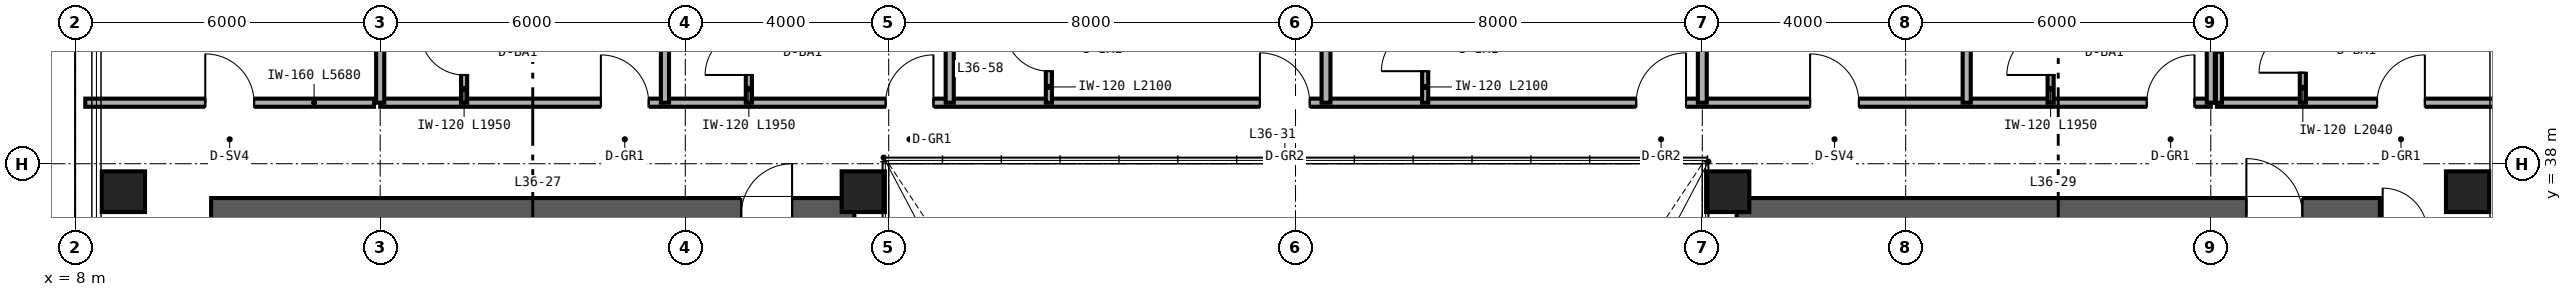
"""IFC4 building model, lengths in metres.
Left out: names, types, materials, properties, quantities, classifications, styles, units other than length and angle.
Written with IfcOpenShell. Run it as: python <this file> out.ifc"""

import sys

from ifc_helpers import new_model, si_unit, direction, frame, frame_2d, origin, origin_2d, place, context, subcontext, project, spatial, rectangle, hollow_rectangle, extrude, source, transform, mapped, element, fill, save


model = new_model("IFC4")
c1 = context("Model", 3, precision=1e-05, world=origin(), true_north=direction((0.0, 1.0)))
c2 = subcontext(c1, "Body", "Model", "MODEL_VIEW")
j1 = project(units=[si_unit("LENGTHUNIT", "METRE"), si_unit("PLANEANGLEUNIT", "RADIAN")], contexts=[c1])
p1 = place(None, origin())
s1 = spatial("IfcSite", under=j1, at=p1, CompositionType="ELEMENT")
p2 = place(p1, origin())
s2 = spatial("IfcBuilding", under=s1, at=p2, CompositionType="ELEMENT")
p3 = place(p2, frame((0.0, 0.0, 144.0)))
s3 = spatial("IfcBuildingStorey", under=s2, at=p3, CompositionType="ELEMENT", Elevation=144.0)
p4 = place(p3, frame((10.675, 37.0, 0.0), z_axis=(0.0, 0.0, 1.0), x_axis=(1.0, 0.0, 0.0)))
e1 = element("IfcWall", 1, at=p4, inside=s3, PredefinedType="SHEAR", context=c2, shape_type="SweptSolid", body=[
    extrude(rectangle(XDim=12.65, YDim=0.65, at=frame_2d((6.325, 0.0))), origin(), (0.0, 0.0, 1.0), 3.36),
])
p5 = place(p4, frame((10.425, 0.0, 0.0)))
e2 = element("IfcOpeningElement", 2, at=p5, cuts=e1, PredefinedType="OPENING", context=c2, shape_type="SweptSolid", body=[
    extrude(rectangle(XDim=1.0, YDim=2.15, at=frame_2d((0.5, 1.075))), frame((0.0, 0.335, 0.0), z_axis=(0.0, -1.0, 0.0), x_axis=(1.0, 0.0, 0.0)), (0.0, 0.0, 1.0), 0.67),
])
p6 = place(p3, frame((40.675, 37.0, 0.0), z_axis=(0.0, 0.0, 1.0), x_axis=(1.0, 0.0, 0.0)))
e3 = element("IfcWall", 3, at=p6, inside=s3, PredefinedType="SHEAR", context=c2, shape_type="SweptSolid", body=[
    extrude(rectangle(XDim=12.65, YDim=0.65, at=frame_2d((6.325, 0.0))), origin(), (0.0, 0.0, 1.0), 3.36),
])
p7 = place(p6, frame((10.025, 0.0, 0.0)))
e4 = element("IfcOpeningElement", 4, at=p7, cuts=e3, PredefinedType="OPENING", context=c2, shape_type="SweptSolid", body=[
    extrude(rectangle(XDim=1.1, YDim=2.15, at=frame_2d((0.55, 1.075))), frame((0.0, 0.335, 0.0), z_axis=(0.0, -1.0, 0.0), x_axis=(1.0, 0.0, 0.0)), (0.0, 0.0, 1.0), 0.67),
])
m1 = source(origin(), c2, "Body", "SweptSolid", [
    extrude(hollow_rectangle(XDim=0.85, YDim=0.8, WallThickness=0.032, at=origin_2d()), origin(), (0.0, 0.0, 1.0), 3.36),
])
for number, where, z_axis, x_axis in (
    (5, (8.95, 37.45, 0.0), (0.0, 0.0, 1.0), (1.0, 0.0, 0.0)),
    (6, (23.5, 37.45, 0.0), (0.0, 0.0, 1.0), (1.0, 0.0, 0.0)),
    (7, (40.5, 37.45, 0.0), (0.0, 0.0, 1.0), (1.0, 0.0, 0.0)),
    (8, (55.05, 37.45, 0.0), (0.0, 0.0, 1.0), (1.0, 0.0, 0.0)),
):
    element("IfcColumn", number, at=place(p3, frame(where, z_axis=z_axis, x_axis=x_axis)), inside=s3, PredefinedType="COLUMN", context=c2, shape_type="MappedRepresentation", body=[
        mapped(m1, transform((0.0, 0.0, 0.0), scale=1.0)),
    ])
p8 = place(p3, frame((8.2, 39.2, 0.0), z_axis=(0.0, 0.0, 1.0), x_axis=(1.0, 0.0, 0.0)))
e9 = element("IfcWall", 9, at=p8, inside=s3, PredefinedType="PARTITIONING", context=c2, shape_type="SweptSolid", body=[
    extrude(rectangle(XDim=5.68, YDim=0.16, at=frame_2d((2.84, 0.0))), origin(), (0.0, 0.0, 1.0), 3.36),
])
p9 = place(p8, frame((2.36, 0.0, 0.0)))
e10 = element("IfcOpeningElement", 10, at=p9, cuts=e9, PredefinedType="OPENING", context=c2, shape_type="SweptSolid", body=[
    extrude(rectangle(XDim=0.96, YDim=2.15, at=frame_2d((0.48, 1.075))), frame((0.0, 0.09, 0.0), z_axis=(0.0, -1.0, 0.0), x_axis=(1.0, 0.0, 0.0)), (0.0, 0.0, 1.0), 0.18),
])
p10 = place(p3, frame((50.12, 39.2, 0.0), z_axis=(0.0, 0.0, 1.0), x_axis=(1.0, 0.0, 0.0)))
e11 = element("IfcWall", 11, at=p10, inside=s3, PredefinedType="PARTITIONING", context=c2, shape_type="SweptSolid", body=[
    extrude(rectangle(XDim=5.68, YDim=0.16, at=frame_2d((2.84, 0.0))), origin(), (0.0, 0.0, 1.0), 3.36),
])
p11 = place(p10, frame((3.15, 0.0, 0.0)))
e12 = element("IfcOpeningElement", 12, at=p11, cuts=e11, PredefinedType="OPENING", context=c2, shape_type="SweptSolid", body=[
    extrude(rectangle(XDim=0.94, YDim=2.15, at=frame_2d((0.47, 1.075))), frame((0.0, 0.09, 0.0), z_axis=(0.0, -1.0, 0.0), x_axis=(1.0, 0.0, 0.0)), (0.0, 0.0, 1.0), 0.18),
])
p12 = place(p3, frame((51.81, 39.2, 0.0), z_axis=(0.0, 0.0, 1.0), x_axis=(0.0, 1.0, 0.0)))
e13 = element("IfcWall", 13, at=p12, inside=s3, PredefinedType="PARTITIONING", context=c2, shape_type="SweptSolid", body=[
    extrude(rectangle(XDim=2.04, YDim=0.12, at=frame_2d((1.02, 0.0))), origin(), (0.0, 0.0, 1.0), 3.36),
])
p13 = place(p12, frame((0.59, 0.0, 0.0)))
e14 = element("IfcOpeningElement", 14, at=p13, cuts=e13, PredefinedType="OPENING", context=c2, shape_type="SweptSolid", body=[
    extrude(rectangle(XDim=0.86, YDim=2.1, at=frame_2d((0.43, 1.05))), frame((0.0, 0.07, 0.0), z_axis=(0.0, -1.0, 0.0), x_axis=(1.0, 0.0, 0.0)), (0.0, 0.0, 1.0), 0.14),
])
p14 = place(p3, frame((50.16, 39.2, 0.0), z_axis=(0.0, 0.0, 1.0), x_axis=(0.0, 1.0, 0.0)))
e15 = element("IfcWall", 15, at=p14, inside=s3, PredefinedType="PARTITIONING", context=c2, shape_type="SweptSolid", body=[
    extrude(rectangle(XDim=2.04, YDim=0.12, at=frame_2d((1.02, 0.0))), origin(), (0.0, 0.0, 1.0), 3.36),
])
p15 = place(p3, frame((14.0, 39.2, 0.0), z_axis=(0.0, 0.0, 1.0), x_axis=(1.0, 0.0, 0.0)))
e16 = element("IfcWall", 16, at=p15, inside=s3, PredefinedType="PARTITIONING", context=c2, shape_type="SweptSolid", body=[
    extrude(rectangle(XDim=36.0, YDim=0.16, at=frame_2d((18.0, 0.0))), origin(), (0.0, 0.0, 1.0), 2.581),
])
p16 = place(p15, frame((4.34, 0.0, 0.0)))
e17 = element("IfcOpeningElement", 17, at=p16, cuts=e16, PredefinedType="OPENING", context=c2, shape_type="SweptSolid", body=[
    extrude(rectangle(XDim=0.94, YDim=2.15, at=frame_2d((0.47, 1.075))), frame((0.0, 0.09, 0.0), z_axis=(0.0, -1.0, 0.0), x_axis=(1.0, 0.0, 0.0)), (0.0, 0.0, 1.0), 0.18),
])
p17 = place(p15, frame((9.94, 0.0, 0.0)))
e18 = element("IfcOpeningElement", 18, at=p17, cuts=e16, PredefinedType="OPENING", context=c2, shape_type="SweptSolid", body=[
    extrude(rectangle(XDim=0.94, YDim=2.15, at=frame_2d((0.47, 1.075))), frame((0.0, 0.09, 0.0), z_axis=(0.0, -1.0, 0.0), x_axis=(1.0, 0.0, 0.0)), (0.0, 0.0, 1.0), 0.18),
])
p18 = place(p15, frame((17.3, 0.0, 0.0)))
e19 = element("IfcOpeningElement", 19, at=p18, cuts=e16, PredefinedType="OPENING", context=c2, shape_type="SweptSolid", body=[
    extrude(rectangle(XDim=0.98, YDim=2.2, at=frame_2d((0.49, 1.1))), frame((0.0, 0.09, 0.0), z_axis=(0.0, -1.0, 0.0), x_axis=(1.0, 0.0, 0.0)), (0.0, 0.0, 1.0), 0.18),
])
p19 = place(p15, frame((24.7, 0.0, 0.0)))
e20 = element("IfcOpeningElement", 20, at=p19, cuts=e16, PredefinedType="OPENING", context=c2, shape_type="SweptSolid", body=[
    extrude(rectangle(XDim=0.98, YDim=2.2, at=frame_2d((0.49, 1.1))), frame((0.0, 0.09, 0.0), z_axis=(0.0, -1.0, 0.0), x_axis=(1.0, 0.0, 0.0)), (0.0, 0.0, 1.0), 0.18),
])
p20 = place(p15, frame((28.12, 0.0, 0.0)))
e21 = element("IfcOpeningElement", 21, at=p20, cuts=e16, PredefinedType="OPENING", context=c2, shape_type="SweptSolid", body=[
    extrude(rectangle(XDim=0.96, YDim=2.15, at=frame_2d((0.48, 1.075))), frame((0.0, 0.09, 0.0), z_axis=(0.0, -1.0, 0.0), x_axis=(1.0, 0.0, 0.0)), (0.0, 0.0, 1.0), 0.18),
])
p21 = place(p15, frame((34.74, 0.0, 0.0)))
e22 = element("IfcOpeningElement", 22, at=p21, cuts=e16, PredefinedType="OPENING", context=c2, shape_type="SweptSolid", body=[
    extrude(rectangle(XDim=0.94, YDim=2.15, at=frame_2d((0.47, 1.075))), frame((0.0, 0.09, 0.0), z_axis=(0.0, -1.0, 0.0), x_axis=(1.0, 0.0, 0.0)), (0.0, 0.0, 1.0), 0.18),
])
for number, where, z_axis, x_axis in (
    (23, (14.0, 39.2, 0.0), (0.0, 0.0, 1.0), (0.0, 1.0, 0.0)),
    (24, (50.0, 39.2, 0.0), (0.0, 0.0, 1.0), (0.0, 1.0, 0.0)),
    (25, (19.6, 39.2, 0.0), (0.0, 0.0, 1.0), (0.0, 1.0, 0.0)),
):
    element("IfcWall", number, at=place(p3, frame(where, z_axis=z_axis, x_axis=x_axis)), inside=s3, PredefinedType="PARTITIONING", context=c2, shape_type="SweptSolid", body=[
        extrude(rectangle(XDim=10.44, YDim=0.16, at=frame_2d((5.22, 0.0))), origin(), (0.0, 0.0, 1.0), 2.667),
    ])
p22 = place(p3, frame((15.65, 39.2, 0.0), z_axis=(0.0, 0.0, 1.0), x_axis=(0.0, 1.0, 0.0)))
e26 = element("IfcWall", 26, at=p22, inside=s3, PredefinedType="PARTITIONING", context=c2, shape_type="SweptSolid", body=[
    extrude(rectangle(XDim=1.95, YDim=0.12, at=frame_2d((0.975, 0.0))), origin(), (0.0, 0.0, 1.0), 3.36),
])
p23 = place(p22, frame((0.545, 0.0, 0.0)))
e27 = element("IfcOpeningElement", 27, at=p23, cuts=e26, PredefinedType="OPENING", context=c2, shape_type="SweptSolid", body=[
    extrude(rectangle(XDim=0.86, YDim=2.1, at=frame_2d((0.43, 1.05))), frame((0.0, 0.07, 0.0), z_axis=(0.0, -1.0, 0.0), x_axis=(1.0, 0.0, 0.0)), (0.0, 0.0, 1.0), 0.14),
])
p24 = place(p3, frame((25.2, 39.2, 0.0), z_axis=(0.0, 0.0, 1.0), x_axis=(0.0, 1.0, 0.0)))
e28 = element("IfcWall", 28, at=p24, inside=s3, PredefinedType="PARTITIONING", context=c2, shape_type="SweptSolid", body=[
    extrude(rectangle(XDim=10.44, YDim=0.16, at=frame_2d((5.22, 0.0))), origin(), (0.0, 0.0, 1.0), 2.433),
])
p25 = place(p3, frame((21.25, 39.2, 0.0), z_axis=(0.0, 0.0, 1.0), x_axis=(0.0, 1.0, 0.0)))
e29 = element("IfcWall", 29, at=p25, inside=s3, PredefinedType="PARTITIONING", context=c2, shape_type="SweptSolid", body=[
    extrude(rectangle(XDim=1.95, YDim=0.12, at=frame_2d((0.975, 0.0))), origin(), (0.0, 0.0, 1.0), 3.36),
])
p26 = place(p25, frame((0.545, 0.0, 0.0)))
e30 = element("IfcOpeningElement", 30, at=p26, cuts=e29, PredefinedType="OPENING", context=c2, shape_type="SweptSolid", body=[
    extrude(rectangle(XDim=0.86, YDim=2.1, at=frame_2d((0.43, 1.05))), frame((0.0, 0.07, 0.0), z_axis=(0.0, -1.0, 0.0), x_axis=(1.0, 0.0, 0.0)), (0.0, 0.0, 1.0), 0.14),
])
p27 = place(p3, frame((32.6, 39.2, 0.0), z_axis=(0.0, 0.0, 1.0), x_axis=(0.0, 1.0, 0.0)))
e31 = element("IfcWall", 31, at=p27, inside=s3, PredefinedType="PARTITIONING", context=c2, shape_type="SweptSolid", body=[
    extrude(rectangle(XDim=10.44, YDim=0.175, at=frame_2d((5.22, 0.0))), origin(), (0.0, 0.0, 1.0), 2.433),
])
p28 = place(p3, frame((27.15, 39.2, 0.0), z_axis=(0.0, 0.0, 1.0), x_axis=(0.0, 1.0, 0.0)))
e32 = element("IfcWall", 32, at=p28, inside=s3, PredefinedType="PARTITIONING", context=c2, shape_type="SweptSolid", body=[
    extrude(rectangle(XDim=2.1, YDim=0.12, at=frame_2d((1.05, 0.0))), origin(), (0.0, 0.0, 1.0), 3.36),
])
p29 = place(p28, frame((0.62, 0.0, 0.0)))
e33 = element("IfcOpeningElement", 33, at=p29, cuts=e32, PredefinedType="OPENING", context=c2, shape_type="SweptSolid", body=[
    extrude(rectangle(XDim=0.86, YDim=2.1, at=frame_2d((0.43, 1.05))), frame((0.0, 0.07, 0.0), z_axis=(0.0, -1.0, 0.0), x_axis=(1.0, 0.0, 0.0)), (0.0, 0.0, 1.0), 0.14),
])
p30 = place(p3, frame((40.0, 39.2, 0.0), z_axis=(0.0, 0.0, 1.0), x_axis=(0.0, 1.0, 0.0)))
e34 = element("IfcWall", 34, at=p30, inside=s3, PredefinedType="PARTITIONING", context=c2, shape_type="SweptSolid", body=[
    extrude(rectangle(XDim=10.44, YDim=0.175, at=frame_2d((5.22, 0.0))), origin(), (0.0, 0.0, 1.0), 2.433),
])
p31 = place(p3, frame((34.55, 39.2, 0.0), z_axis=(0.0, 0.0, 1.0), x_axis=(0.0, 1.0, 0.0)))
e35 = element("IfcWall", 35, at=p31, inside=s3, PredefinedType="PARTITIONING", context=c2, shape_type="SweptSolid", body=[
    extrude(rectangle(XDim=2.1, YDim=0.12, at=frame_2d((1.05, 0.0))), origin(), (0.0, 0.0, 1.0), 3.36),
])
p32 = place(p31, frame((0.62, 0.0, 0.0)))
e36 = element("IfcOpeningElement", 36, at=p32, cuts=e35, PredefinedType="OPENING", context=c2, shape_type="SweptSolid", body=[
    extrude(rectangle(XDim=0.86, YDim=2.1, at=frame_2d((0.43, 1.05))), frame((0.0, 0.07, 0.0), z_axis=(0.0, -1.0, 0.0), x_axis=(1.0, 0.0, 0.0)), (0.0, 0.0, 1.0), 0.14),
])
p33 = place(p3, frame((45.2, 39.2, 0.0), z_axis=(0.0, 0.0, 1.0), x_axis=(0.0, 1.0, 0.0)))
e37 = element("IfcWall", 37, at=p33, inside=s3, PredefinedType="PARTITIONING", context=c2, shape_type="SweptSolid", body=[
    extrude(rectangle(XDim=10.44, YDim=0.16, at=frame_2d((5.22, 0.0))), origin(), (0.0, 0.0, 1.0), 2.667),
])
p34 = place(p3, frame((46.85, 39.2, 0.0), z_axis=(0.0, 0.0, 1.0), x_axis=(0.0, 1.0, 0.0)))
e38 = element("IfcWall", 38, at=p34, inside=s3, PredefinedType="PARTITIONING", context=c2, shape_type="SweptSolid", body=[
    extrude(rectangle(XDim=1.95, YDim=0.12, at=frame_2d((0.975, 0.0))), origin(), (0.0, 0.0, 1.0), 3.36),
])
p35 = place(p34, frame((0.545, 0.0, 0.0)))
e39 = element("IfcOpeningElement", 39, at=p35, cuts=e38, PredefinedType="OPENING", context=c2, shape_type="SweptSolid", body=[
    extrude(rectangle(XDim=0.86, YDim=2.1, at=frame_2d((0.43, 1.05))), frame((0.0, 0.07, 0.0), z_axis=(0.0, -1.0, 0.0), x_axis=(1.0, 0.0, 0.0)), (0.0, 0.0, 1.0), 0.14),
])
m2 = source(origin(), c2, "Body", "SweptSolid", [
    extrude(rectangle(XDim=1.0, YDim=2.15, at=frame_2d((0.5, 1.075))), frame((0.0, 0.025, 0.0), z_axis=(0.0, -1.0, 0.0), x_axis=(1.0, 0.0, 0.0)), (0.0, 0.0, 1.0), 0.05),
])
p36 = place(p5, origin())
e40 = element("IfcDoor", 40, at=p36, inside=s3, OperationType="SINGLE_SWING_RIGHT", PredefinedType="DOOR", context=c2, shape_type="MappedRepresentation", body=[
    mapped(m2, transform((0.0, 0.0, 0.0), scale=1.0)),
])
fill(e2, e40)
m3 = source(origin(), c2, "Body", "SweptSolid", [
    extrude(rectangle(XDim=1.1, YDim=2.15, at=frame_2d((0.55, 1.075))), frame((0.0, 0.025, 0.0), z_axis=(0.0, -1.0, 0.0), x_axis=(1.0, 0.0, 0.0)), (0.0, 0.0, 1.0), 0.05),
])
p37 = place(p7, origin())
e41 = element("IfcDoor", 41, at=p37, inside=s3, OperationType="SINGLE_SWING_LEFT", PredefinedType="DOOR", context=c2, shape_type="MappedRepresentation", body=[
    mapped(m3, transform((0.0, 0.0, 0.0), scale=1.0)),
])
fill(e4, e41)
m4 = source(origin(), c2, "Body", "SweptSolid", [
    extrude(rectangle(XDim=0.96, YDim=2.15, at=frame_2d((0.48, 1.075))), frame((0.0, 0.025, 0.0), z_axis=(0.0, -1.0, 0.0), x_axis=(1.0, 0.0, 0.0)), (0.0, 0.0, 1.0), 0.05),
])
p38 = place(p9, origin())
e42 = element("IfcDoor", 42, at=p38, inside=s3, OperationType="SINGLE_SWING_LEFT", PredefinedType="DOOR", context=c2, shape_type="MappedRepresentation", body=[
    mapped(m4, transform((0.0, 0.0, 0.0), scale=1.0)),
])
fill(e10, e42)
m5 = source(origin(), c2, "Body", "SweptSolid", [
    extrude(rectangle(XDim=0.86, YDim=2.1, at=frame_2d((0.43, 1.05))), frame((0.0, 0.025, 0.0), z_axis=(0.0, -1.0, 0.0), x_axis=(1.0, 0.0, 0.0)), (0.0, 0.0, 1.0), 0.05),
])
p39 = place(p13, origin())
e43 = element("IfcDoor", 43, at=p39, inside=s3, OperationType="SINGLE_SWING_LEFT", PredefinedType="DOOR", context=c2, shape_type="MappedRepresentation", body=[
    mapped(m5, transform((0.0, 0.0, 0.0), scale=1.0)),
])
fill(e14, e43)
m6 = source(origin(), c2, "Body", "SweptSolid", [
    extrude(rectangle(XDim=0.94, YDim=2.15, at=frame_2d((0.47, 1.075))), frame((0.0, 0.025, 0.0), z_axis=(0.0, -1.0, 0.0), x_axis=(1.0, 0.0, 0.0)), (0.0, 0.0, 1.0), 0.05),
])
p40 = place(p11, origin())
e44 = element("IfcDoor", 44, at=p40, inside=s3, OperationType="SINGLE_SWING_RIGHT", PredefinedType="DOOR", context=c2, shape_type="MappedRepresentation", body=[
    mapped(m6, transform((0.0, 0.0, 0.0), scale=1.0)),
])
fill(e12, e44)
p41 = place(p23, origin())
e45 = element("IfcDoor", 45, at=p41, inside=s3, OperationType="SINGLE_SWING_RIGHT", PredefinedType="DOOR", context=c2, shape_type="MappedRepresentation", body=[
    mapped(m5, transform((0.0, 0.0, 0.0), scale=1.0)),
])
fill(e27, e45)
p42 = place(p26, origin())
e46 = element("IfcDoor", 46, at=p42, inside=s3, OperationType="SINGLE_SWING_LEFT", PredefinedType="DOOR", context=c2, shape_type="MappedRepresentation", body=[
    mapped(m5, transform((0.0, 0.0, 0.0), scale=1.0)),
])
fill(e30, e46)
p43 = place(p29, origin())
e47 = element("IfcDoor", 47, at=p43, inside=s3, OperationType="SINGLE_SWING_RIGHT", PredefinedType="DOOR", context=c2, shape_type="MappedRepresentation", body=[
    mapped(m5, transform((0.0, 0.0, 0.0), scale=1.0)),
])
fill(e33, e47)
p44 = place(p32, origin())
e48 = element("IfcDoor", 48, at=p44, inside=s3, OperationType="SINGLE_SWING_LEFT", PredefinedType="DOOR", context=c2, shape_type="MappedRepresentation", body=[
    mapped(m5, transform((0.0, 0.0, 0.0), scale=1.0)),
])
fill(e36, e48)
p45 = place(p35, origin())
e49 = element("IfcDoor", 49, at=p45, inside=s3, OperationType="SINGLE_SWING_LEFT", PredefinedType="DOOR", context=c2, shape_type="MappedRepresentation", body=[
    mapped(m5, transform((0.0, 0.0, 0.0), scale=1.0)),
])
fill(e39, e49)
p46 = place(p16, origin())
e50 = element("IfcDoor", 50, at=p46, inside=s3, OperationType="SINGLE_SWING_LEFT", PredefinedType="DOOR", context=c2, shape_type="MappedRepresentation", body=[
    mapped(m6, transform((0.0, 0.0, 0.0), scale=1.0)),
])
fill(e17, e50)
p47 = place(p17, origin())
e51 = element("IfcDoor", 51, at=p47, inside=s3, OperationType="SINGLE_SWING_RIGHT", PredefinedType="DOOR", context=c2, shape_type="MappedRepresentation", body=[
    mapped(m6, transform((0.0, 0.0, 0.0), scale=1.0)),
])
fill(e18, e51)
m7 = source(origin(), c2, "Body", "SweptSolid", [
    extrude(rectangle(XDim=0.98, YDim=2.2, at=frame_2d((0.49, 1.1))), frame((0.0, 0.025, 0.0), z_axis=(0.0, -1.0, 0.0), x_axis=(1.0, 0.0, 0.0)), (0.0, 0.0, 1.0), 0.05),
])
p48 = place(p18, origin())
e52 = element("IfcDoor", 52, at=p48, inside=s3, OperationType="SINGLE_SWING_LEFT", PredefinedType="DOOR", context=c2, shape_type="MappedRepresentation", body=[
    mapped(m7, transform((0.0, 0.0, 0.0), scale=1.0)),
])
fill(e19, e52)
p49 = place(p19, origin())
e53 = element("IfcDoor", 53, at=p49, inside=s3, OperationType="SINGLE_SWING_RIGHT", PredefinedType="DOOR", context=c2, shape_type="MappedRepresentation", body=[
    mapped(m7, transform((0.0, 0.0, 0.0), scale=1.0)),
])
fill(e20, e53)
p50 = place(p20, origin())
e54 = element("IfcDoor", 54, at=p50, inside=s3, OperationType="SINGLE_SWING_LEFT", PredefinedType="DOOR", context=c2, shape_type="MappedRepresentation", body=[
    mapped(m4, transform((0.0, 0.0, 0.0), scale=1.0)),
])
fill(e21, e54)
p51 = place(p21, origin())
e55 = element("IfcDoor", 55, at=p51, inside=s3, OperationType="SINGLE_SWING_RIGHT", PredefinedType="DOOR", context=c2, shape_type="MappedRepresentation", body=[
    mapped(m6, transform((0.0, 0.0, 0.0), scale=1.0)),
])
fill(e22, e55)
save(model, sys.argv[1])
